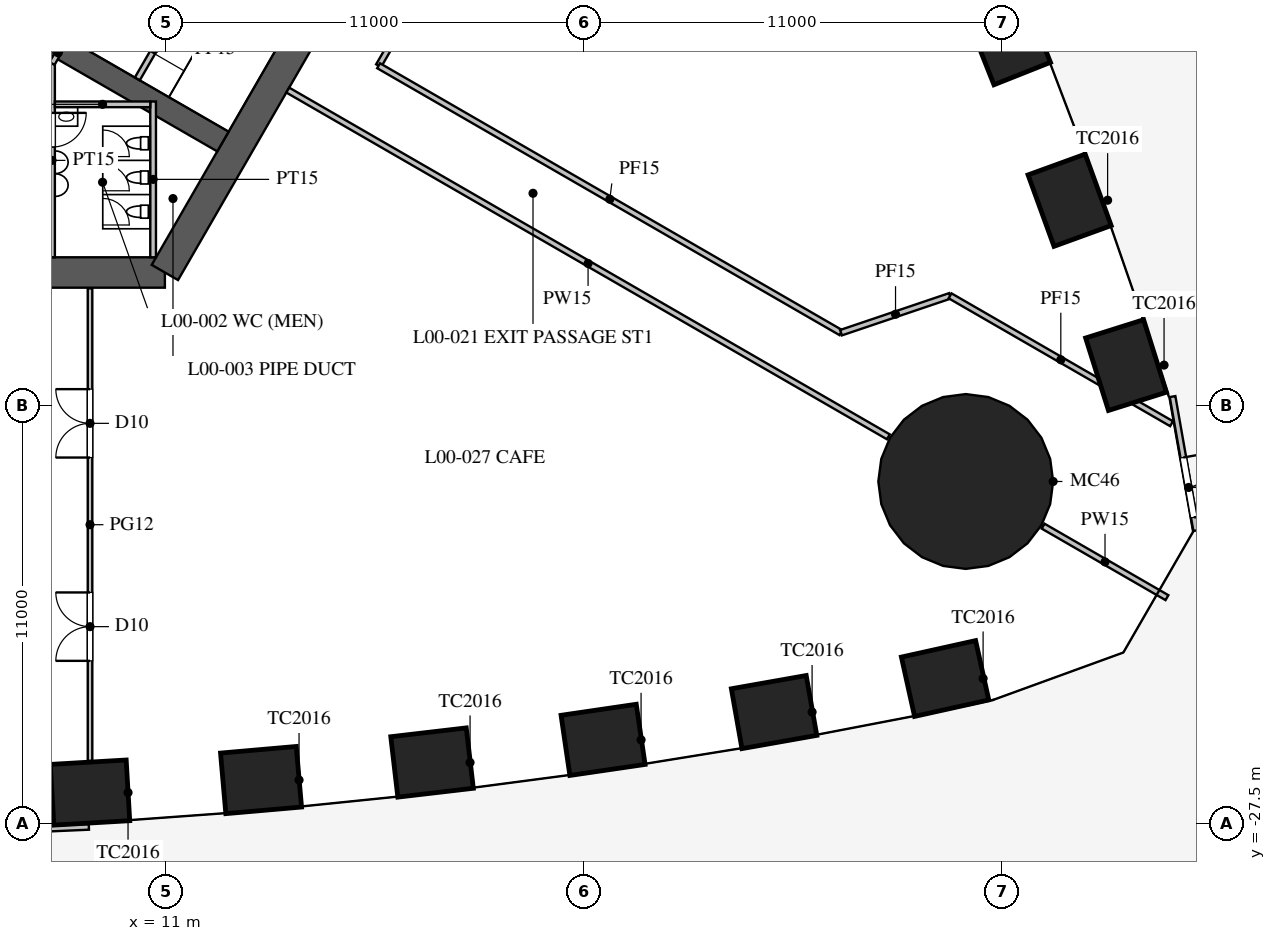
"""IFC4 building model, lengths in metres.
Left out: names, types, materials, properties, quantities, classifications, styles, units other than length and angle.
Written with IfcOpenShell. Run it as: python <this file> out.ifc"""

import sys

from ifc_helpers import new_model, si_unit, direction, frame, frame_2d, origin, origin_2d, place, context, subcontext, project, spatial, rectangle, circle, extrude, element, fill, save


model = new_model("IFC4")
c1 = context("Model", 3, precision=1e-05, world=origin(), true_north=direction((0.0, 1.0)))
c2 = subcontext(c1, "Body", "Model", "MODEL_VIEW")
j1 = project(units=[si_unit("LENGTHUNIT", "METRE"), si_unit("PLANEANGLEUNIT", "RADIAN")], contexts=[c1])
p1 = place(None, origin())
s1 = spatial("IfcSite", under=j1, at=p1, CompositionType="ELEMENT")
p2 = place(p1, origin())
s2 = spatial("IfcBuilding", under=s1, at=p2, CompositionType="ELEMENT")
p3 = place(p2, origin())
s3 = spatial("IfcBuildingStorey", under=s2, at=p3, CompositionType="ELEMENT", Elevation=0.0)
for number, where, z_axis, x_axis in (
    (1, (9.0, -26.686, 0.0), (0.0, 0.0, 1.0), (0.998, 0.058, 0.0)),
    (2, (13.5, -26.357, 0.0), (0.0, 0.0, 1.0), (0.996, 0.087, 0.0)),
    (3, (18.0, -25.895, 0.0), (0.0, 0.0, 1.0), (0.993, 0.116, 0.0)),
    (4, (22.5, -25.299, 0.0), (0.0, 0.0, 1.0), (0.989, 0.145, 0.0)),
    (5, (27.0, -24.568, 0.0), (0.0, 0.0, 1.0), (0.985, 0.174, 0.0)),
    (6, (31.5, -23.685, 0.0), (0.0, 0.0, 1.0), (0.976, 0.217, 0.0)),
    (7, (36.262, -15.438, 0.0), (0.0, 0.0, 1.0), (-0.3, 0.954, 0.0)),
    (8, (34.776, -11.099, 0.0), (0.0, 0.0, 1.0), (-0.342, 0.94, 0.0)),
    (9, (33.16, -6.836, 0.0), (0.0, 0.0, 1.0), (-0.369, 0.929, 0.0)),
):
    element("IfcColumn", number, at=place(p3, frame(where, z_axis=z_axis, x_axis=x_axis)), inside=s3, PredefinedType="COLUMN", context=c2, shape_type="SweptSolid", body=[
        extrude(rectangle(XDim=2.0, YDim=1.6, at=origin_2d()), origin(), (0.0, 0.0, 1.0), 6.5),
    ])
p4 = place(p3, frame((32.043, -18.5, 0.0), z_axis=(0.0, 0.0, 1.0), x_axis=(1.0, 0.0, 0.0)))
e10 = element("IfcColumn", 10, at=p4, inside=s3, PredefinedType="COLUMN", context=c2, shape_type="SweptSolid", body=[
    extrude(circle(Radius=2.3, at=origin_2d()), origin(), (0.0, 0.0, 1.0), 6.5),
])
p5 = place(p3, frame((-10.97, -13.0, 0.0), z_axis=(0.0, 0.0, 1.0), x_axis=(1.0, 0.0, 0.0)))
e11 = element("IfcWall", 11, at=p5, inside=s3, PredefinedType="SHEAR", context=c2, shape_type="SweptSolid", body=[
    extrude(rectangle(XDim=21.939, YDim=0.8, at=frame_2d((10.97, 0.0))), origin(), (0.0, 0.0, 1.0), 6.5),
])
p6 = place(p5, frame((16.97, 0.0, 0.0)))
e12 = element("IfcOpeningElement", 12, at=p6, cuts=e11, PredefinedType="OPENING", context=c2, shape_type="SweptSolid", body=[
    extrude(rectangle(XDim=1.8, YDim=2.1, at=frame_2d((0.9, 1.05))), frame((0.0, 0.41, 0.0), z_axis=(0.0, -1.0, 0.0), x_axis=(1.0, 0.0, 0.0)), (0.0, 0.0, 1.0), 0.82),
])
p7 = place(p5, frame((3.27, 0.0, 0.0)))
e13 = element("IfcOpeningElement", 13, at=p7, cuts=e11, PredefinedType="OPENING", context=c2, shape_type="SweptSolid", body=[
    extrude(rectangle(XDim=1.6, YDim=2.1, at=frame_2d((0.8, 1.05))), frame((0.0, 0.41, 0.0), z_axis=(0.0, -1.0, 0.0), x_axis=(1.0, 0.0, 0.0)), (0.0, 0.0, 1.0), 0.82),
])
p8 = place(p3, frame((10.97, -13.0, 0.0), z_axis=(0.0, 0.0, 1.0), x_axis=(0.499995765644, 0.866027848477, 0.0)))
e14 = element("IfcWall", 14, at=p8, inside=s3, PredefinedType="SHEAR", context=c2, shape_type="SweptSolid", body=[
    extrude(rectangle(XDim=11.547, YDim=0.8, at=frame_2d((5.773, 0.0))), origin(), (0.0, 0.0, 1.0), 6.5),
])
p9 = place(p3, frame((4.638, -5.016, 0.0), z_axis=(0.0, 0.0, 1.0), x_axis=(0.866019375473, -0.500010441196, 0.0)))
e15 = element("IfcWall", 15, at=p9, inside=s3, PredefinedType="SHEAR", context=c2, shape_type="SweptSolid", body=[
    extrude(rectangle(XDim=9.075, YDim=0.6, at=frame_2d((4.538, 0.0))), origin(), (0.0, 0.0, 1.0), 6.5),
])
p10 = place(p3, frame((4.539, -27.782, 0.0), z_axis=(0.0, 0.0, 1.0), x_axis=(0.999053663589, 0.043494565978, 0.0)))
e16 = element("IfcWall", 16, at=p10, inside=s3, PredefinedType="SOLIDWALL", context=c2, shape_type="SweptSolid", body=[
    extrude(rectangle(XDim=4.434, YDim=0.15, at=frame_2d((2.217, 0.0))), origin(), (0.0, 0.0, 1.0), 6.48),
])
p11 = place(p10, frame((1.217, 0.0, 0.0)))
e17 = element("IfcOpeningElement", 17, at=p11, cuts=e16, PredefinedType="OPENING", context=c2, shape_type="SweptSolid", body=[
    extrude(rectangle(XDim=2.0, YDim=3.0, at=frame_2d((1.0, 1.5))), frame((0.0, 0.085, 0.0), z_axis=(0.0, -1.0, 0.0), x_axis=(1.0, 0.0, 0.0)), (0.0, 0.0, 1.0), 0.17),
])
p12 = place(p3, frame((38.107, -19.79, 0.0), z_axis=(0.0, 0.0, 1.0), x_axis=(-0.173652987794, 0.984806904845, 0.0)))
e18 = element("IfcWall", 18, at=p12, inside=s3, PredefinedType="SOLIDWALL", context=c2, shape_type="SweptSolid", body=[
    extrude(rectangle(XDim=3.578, YDim=0.15, at=frame_2d((1.789, 0.0))), origin(), (0.0, 0.0, 1.0), 6.48),
])
p13 = place(p12, frame((0.35, 0.0, 0.0)))
e19 = element("IfcOpeningElement", 19, at=p13, cuts=e18, PredefinedType="OPENING", context=c2, shape_type="SweptSolid", body=[
    extrude(rectangle(XDim=1.6, YDim=2.4, at=frame_2d((0.8, 1.2))), frame((0.0, 0.085, 0.0), z_axis=(0.0, -1.0, 0.0), x_axis=(1.0, 0.0, 0.0)), (0.0, 0.0, 1.0), 0.17),
])
p14 = place(p3, frame((8.0, -7.5, 0.0), z_axis=(0.0, 0.0, 1.0), x_axis=(0.0, -1.0, 0.0)))
e20 = element("IfcWall", 20, at=p14, inside=s3, PredefinedType="PARTITIONING", context=c2, shape_type="SweptSolid", body=[
    extrude(rectangle(XDim=5.1, YDim=0.15, at=frame_2d((2.55, 0.0))), origin(), (0.0, 0.0, 1.0), 6.3),
])
p15 = place(p14, frame((1.3, 0.0, 0.0)))
e21 = element("IfcOpeningElement", 21, at=p15, cuts=e20, PredefinedType="OPENING", context=c2, shape_type="SweptSolid", body=[
    extrude(rectangle(XDim=0.9, YDim=2.1, at=frame_2d((0.45, 1.05))), frame((0.0, 0.085, 0.0), z_axis=(0.0, -1.0, 0.0), x_axis=(1.0, 0.0, 0.0)), (0.0, 0.0, 1.0), 0.17),
])
p16 = place(p3, frame((8.0, -7.5, 0.0), z_axis=(0.0, 0.0, 1.0), x_axis=(0.499842556608, 0.866116284689, 0.0)))
e22 = element("IfcWall", 22, at=p16, inside=s3, PredefinedType="PARTITIONING", context=c2, shape_type="SweptSolid", body=[
    extrude(rectangle(XDim=0.645, YDim=0.15, at=frame_2d((0.323, 0.0))), origin(), (0.0, 0.0, 1.0), 6.3),
])
p17 = place(p3, frame((10.66, -8.5, 0.0), z_axis=(0.0, 0.0, 1.0), x_axis=(0.0, -1.0, 0.0)))
e23 = element("IfcWall", 23, at=p17, inside=s3, PredefinedType="PARTITIONING", context=c2, shape_type="SweptSolid", body=[
    extrude(rectangle(XDim=4.1, YDim=0.15, at=frame_2d((2.05, 0.0))), origin(), (0.0, 0.0, 1.0), 6.3),
])
p18 = place(p3, frame((8.075, -8.575, 0.0), z_axis=(0.0, 0.0, 1.0), x_axis=(1.0, 0.0, 0.0)))
e24 = element("IfcWall", 24, at=p18, inside=s3, PredefinedType="PARTITIONING", context=c2, shape_type="SweptSolid", body=[
    extrude(rectangle(XDim=2.51, YDim=0.15, at=frame_2d((1.255, 0.0))), origin(), (0.0, 0.0, 1.0), 6.3),
])
p19 = place(p3, frame((14.203, -8.2, 0.0), z_axis=(0.0, 0.0, 1.0), x_axis=(0.866024965723, -0.500000758745, 0.0)))
e25 = element("IfcWall", 25, at=p19, inside=s3, PredefinedType="PARTITIONING", context=c2, shape_type="SweptSolid", body=[
    extrude(rectangle(XDim=18.25, YDim=0.15, at=frame_2d((9.125, 0.0))), origin(), (0.0, 0.0, 1.0), 4.6),
])
p20 = place(p3, frame((34.078, -19.675, 0.0), z_axis=(0.0, 0.0, 1.0), x_axis=(0.866019247219, -0.500010663332, 0.0)))
e26 = element("IfcWall", 26, at=p20, inside=s3, PredefinedType="PARTITIONING", context=c2, shape_type="SweptSolid", body=[
    extrude(rectangle(XDim=3.764, YDim=0.15, at=frame_2d((1.882, 0.0))), origin(), (0.0, 0.0, 1.0), 4.6),
])
p21 = place(p3, frame((9.0, -13.42, 0.0), z_axis=(0.0, 0.0, 1.0), x_axis=(0.0, -1.0, 0.0)))
e27 = element("IfcWall", 27, at=p21, inside=s3, PredefinedType="PARTITIONING", context=c2, shape_type="SweptSolid", body=[
    extrude(rectangle(XDim=12.435, YDim=0.12, at=frame_2d((6.217, 0.0))), origin(), (0.0, 0.0, 1.0), 5.0),
])
p22 = place(p21, frame((2.65, 0.0, 0.0)))
e28 = element("IfcOpeningElement", 28, at=p22, cuts=e27, PredefinedType="OPENING", context=c2, shape_type="SweptSolid", body=[
    extrude(rectangle(XDim=1.8, YDim=2.1, at=frame_2d((0.9, 1.05))), frame((0.0, 0.07, 0.0), z_axis=(0.0, -1.0, 0.0), x_axis=(1.0, 0.0, 0.0)), (0.0, 0.0, 1.0), 0.14),
])
p23 = place(p21, frame((8.0, 0.0, 0.0)))
e29 = element("IfcOpeningElement", 29, at=p23, cuts=e27, PredefinedType="OPENING", context=c2, shape_type="SweptSolid", body=[
    extrude(rectangle(XDim=1.8, YDim=2.1, at=frame_2d((0.9, 1.05))), frame((0.0, 0.07, 0.0), z_axis=(0.0, -1.0, 0.0), x_axis=(1.0, 0.0, 0.0)), (0.0, 0.0, 1.0), 0.14),
])
p24 = place(p3, frame((10.244, -7.906, 0.0), z_axis=(0.0, 0.0, 1.0), x_axis=(0.499961193289, 0.866047807691, 0.0)))
e30 = element("IfcWall", 30, at=p24, inside=s3, PredefinedType="PARTITIONING", context=c2, shape_type="SweptSolid", body=[
    extrude(rectangle(XDim=1.8, YDim=0.15, at=frame_2d((0.9, 0.0))), origin(), (0.0, 0.0, 1.0), 3.575),
])
p25 = place(p3, frame((19.226, -3.0, 0.0), z_axis=(0.0, 0.0, 1.0), x_axis=(-0.500014132739, -0.86601724409, 0.0)))
e31 = element("IfcWall", 31, at=p25, inside=s3, PredefinedType="PARTITIONING", context=c2, shape_type="SweptSolid", body=[
    extrude(rectangle(XDim=5.265, YDim=0.15, at=frame_2d((2.632, 0.0))), origin(), (0.0, 0.0, 1.0), 6.3),
])
p26 = place(p3, frame((16.593, -7.56, 0.0), z_axis=(0.0, 0.0, 1.0), x_axis=(0.86602961784, -0.499992700971, 0.0)))
e32 = element("IfcWall", 32, at=p26, inside=s3, PredefinedType="PARTITIONING", context=c2, shape_type="SweptSolid", body=[
    extrude(rectangle(XDim=14.05, YDim=0.15, at=frame_2d((7.025, 0.0))), origin(), (0.0, 0.0, 1.0), 6.3),
])
p27 = place(p3, frame((28.761, -14.584, 0.0), z_axis=(0.0, 0.0, 1.0), x_axis=(0.947320595797, 0.32028688512, 0.0)))
e33 = element("IfcWall", 33, at=p27, inside=s3, PredefinedType="PARTITIONING", context=c2, shape_type="SweptSolid", body=[
    extrude(rectangle(XDim=3.029, YDim=0.15, at=frame_2d((1.515, 0.0))), origin(), (0.0, 0.0, 1.0), 5.7),
])
p28 = place(p3, frame((31.631, -13.614, 0.0), z_axis=(0.0, 0.0, 1.0), x_axis=(0.866020068361, -0.500009241111, 0.0)))
e34 = element("IfcWall", 34, at=p28, inside=s3, PredefinedType="PARTITIONING", context=c2, shape_type="SweptSolid", body=[
    extrude(rectangle(XDim=6.73, YDim=0.15, at=frame_2d((3.365, 0.0))), origin(), (0.0, 0.0, 1.0), 6.3),
])
p29 = place(p13, frame((1.6, 0.0, 0.0), z_axis=(0.0, 0.0, 1.0), x_axis=(-1.0, 0.0, 0.0)))
e35 = element("IfcDoor", 35, at=p29, inside=s3, OperationType="DOUBLE_DOOR_SINGLE_SWING", PredefinedType="DOOR", context=c2, shape_type="SweptSolid", body=[
    extrude(rectangle(XDim=1.6, YDim=2.4, at=frame_2d((0.8, 1.2))), frame((0.0, 0.025, 0.0), z_axis=(0.0, -1.0, 0.0), x_axis=(1.0, 0.0, 0.0)), (0.0, 0.0, 1.0), 0.05),
])
fill(e19, e35)
p30 = place(p15, origin())
e36 = element("IfcDoor", 36, at=p30, inside=s3, OperationType="SINGLE_SWING_LEFT", PredefinedType="DOOR", context=c2, shape_type="SweptSolid", body=[
    extrude(rectangle(XDim=0.9, YDim=2.1, at=frame_2d((0.45, 1.05))), frame((0.0, 0.025, 0.0), z_axis=(0.0, -1.0, 0.0), x_axis=(1.0, 0.0, 0.0)), (0.0, 0.0, 1.0), 0.05),
])
fill(e21, e36)
p31 = place(p22, frame((1.8, 0.0, 0.0), z_axis=(0.0, 0.0, 1.0), x_axis=(-1.0, 0.0, 0.0)))
e37 = element("IfcDoor", 37, at=p31, inside=s3, OperationType="DOUBLE_DOOR_SINGLE_SWING", PredefinedType="DOOR", context=c2, shape_type="SweptSolid", body=[
    extrude(rectangle(XDim=1.8, YDim=2.1, at=frame_2d((0.9, 1.05))), frame((0.0, 0.025, 0.0), z_axis=(0.0, -1.0, 0.0), x_axis=(1.0, 0.0, 0.0)), (0.0, 0.0, 1.0), 0.05),
])
fill(e28, e37)
p32 = place(p23, frame((1.8, 0.0, 0.0), z_axis=(0.0, 0.0, 1.0), x_axis=(-1.0, 0.0, 0.0)))
e38 = element("IfcDoor", 38, at=p32, inside=s3, OperationType="DOUBLE_DOOR_SINGLE_SWING", PredefinedType="DOOR", context=c2, shape_type="SweptSolid", body=[
    extrude(rectangle(XDim=1.8, YDim=2.1, at=frame_2d((0.9, 1.05))), frame((0.0, 0.025, 0.0), z_axis=(0.0, -1.0, 0.0), x_axis=(1.0, 0.0, 0.0)), (0.0, 0.0, 1.0), 0.05),
])
fill(e29, e38)
save(model, sys.argv[1])
